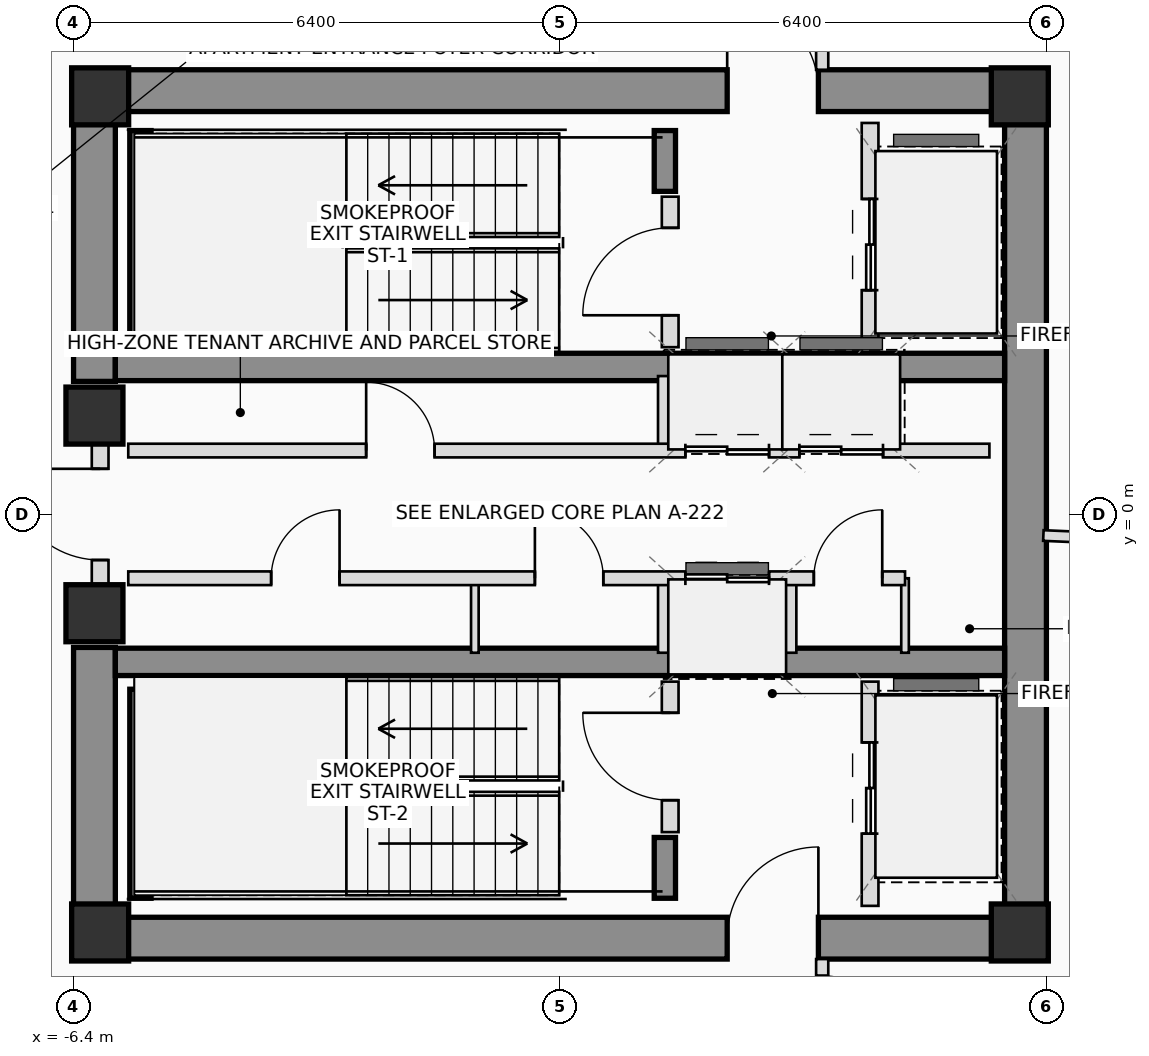
"""IFC4 building model, lengths in metres.
Left out: names, types, materials, properties, quantities, classifications, styles, units other than length and angle.
Written with IfcOpenShell. Run it as: python <this file> out.ifc"""

import sys

from ifc_helpers import new_model, si_unit, direction, frame, frame_2d, origin, origin_2d, place, context, subcontext, project, spatial, rectangle, extrude, source, transform, mapped, element, fill, save


model = new_model("IFC4")
c1 = context("Model", 3, precision=1e-05, world=origin(), true_north=direction((0.0, 1.0)))
c2 = subcontext(c1, "Body", "Model", "MODEL_VIEW")
j1 = project(units=[si_unit("LENGTHUNIT", "METRE"), si_unit("PLANEANGLEUNIT", "RADIAN")], contexts=[c1])
p1 = place(None, origin())
s1 = spatial("IfcSite", under=j1, at=p1, CompositionType="ELEMENT")
p2 = place(p1, origin())
s2 = spatial("IfcBuilding", under=s1, at=p2, CompositionType="ELEMENT")
p3 = place(p2, frame((0.0, 0.0, 232.05)))
s3 = spatial("IfcBuildingStorey", under=s2, at=p3, CompositionType="ELEMENT", Elevation=232.05)
m1 = source(origin(), c2, "Body", "SweptSolid", [
    extrude(rectangle(XDim=0.75, YDim=0.75, at=origin_2d()), origin(), (0.0, 0.0, 1.0), 3.4),
])
for number, where, z_axis, x_axis in (
    (1, (-6.05, -5.5, 0.0), (0.0, 0.0, 1.0), (1.0, 0.0, 0.0)),
    (2, (6.05, -5.5, 0.0), (0.0, 0.0, 1.0), (1.0, 0.0, 0.0)),
    (3, (6.05, 5.5, 0.0), (0.0, 0.0, 1.0), (1.0, 0.0, 0.0)),
    (4, (-6.05, 5.5, 0.0), (0.0, 0.0, 1.0), (1.0, 0.0, 0.0)),
):
    element("IfcColumn", number, at=place(p3, frame(where, z_axis=z_axis, x_axis=x_axis)), inside=s3, PredefinedType="COLUMN", context=c2, shape_type="MappedRepresentation", body=[
        mapped(m1, transform((0.0, 0.0, 0.0), scale=1.0)),
    ])
p4 = place(p3, frame((-6.4, 5.575, 0.0), z_axis=(0.0, 0.0, 1.0), x_axis=(1.0, 0.0, 0.0)))
e5 = element("IfcWall", 5, at=p4, inside=s3, PredefinedType="SHEAR", context=c2, shape_type="SweptSolid", body=[
    extrude(rectangle(XDim=12.8, YDim=0.55, at=frame_2d((6.4, 0.0))), origin(), (0.0, 0.0, 1.0), 3.4),
])
p5 = place(p4, frame((8.6, 0.0, 0.0)))
e6 = element("IfcOpeningElement", 6, at=p5, cuts=e5, PredefinedType="OPENING", context=c2, shape_type="SweptSolid", body=[
    extrude(rectangle(XDim=1.2, YDim=2.2, at=frame_2d((0.6, 1.1))), frame((0.0, 0.285, 0.0), z_axis=(0.0, -1.0, 0.0), x_axis=(1.0, 0.0, 0.0)), (0.0, 0.0, 1.0), 0.57),
])
p6 = place(p3, frame((-6.4, -5.575, 0.0), z_axis=(0.0, 0.0, 1.0), x_axis=(1.0, 0.0, 0.0)))
e7 = element("IfcWall", 7, at=p6, inside=s3, PredefinedType="SHEAR", context=c2, shape_type="SweptSolid", body=[
    extrude(rectangle(XDim=12.8, YDim=0.55, at=frame_2d((6.4, 0.0))), origin(), (0.0, 0.0, 1.0), 3.4),
])
p7 = place(p6, frame((8.6, 0.0, 0.0)))
e8 = element("IfcOpeningElement", 8, at=p7, cuts=e7, PredefinedType="OPENING", context=c2, shape_type="SweptSolid", body=[
    extrude(rectangle(XDim=1.2, YDim=2.2, at=frame_2d((0.6, 1.1))), frame((0.0, 0.285, 0.0), z_axis=(0.0, -1.0, 0.0), x_axis=(1.0, 0.0, 0.0)), (0.0, 0.0, 1.0), 0.57),
])
p8 = place(p3, frame((6.125, -5.3, 0.0), z_axis=(0.0, 0.0, 1.0), x_axis=(0.0, 1.0, 0.0)))
e9 = element("IfcWall", 9, at=p8, inside=s3, PredefinedType="SHEAR", context=c2, shape_type="SweptSolid", body=[
    extrude(rectangle(XDim=10.6, YDim=0.55, at=frame_2d((5.3, 0.0))), origin(), (0.0, 0.0, 1.0), 3.4),
])
for number, where, z_axis, x_axis in (
    (10, (-6.125, -5.3, 0.0), (0.0, 0.0, 1.0), (0.0, 1.0, 0.0)),
    (11, (-6.125, 1.75, 0.0), (0.0, 0.0, 1.0), (0.0, 1.0, 0.0)),
):
    element("IfcWall", number, at=place(p3, frame(where, z_axis=z_axis, x_axis=x_axis)), inside=s3, PredefinedType="SHEAR", context=c2, shape_type="SweptSolid", body=[
        extrude(rectangle(XDim=3.55, YDim=0.55, at=frame_2d((1.775, 0.0))), origin(), (0.0, 0.0, 1.0), 3.4),
    ])
for number, where, z_axis, x_axis in (
    (12, (-5.85, 1.94, 0.0), (0.0, 0.0, 1.0), (1.0, 0.0, 0.0)),
    (13, (-5.85, -1.94, 0.0), (0.0, 0.0, 1.0), (1.0, 0.0, 0.0)),
):
    element("IfcWall", number, at=place(p3, frame(where, z_axis=z_axis, x_axis=x_axis)), inside=s3, PredefinedType="SHEAR", context=c2, shape_type="SweptSolid", body=[
        extrude(rectangle(XDim=11.7, YDim=0.36, at=frame_2d((5.85, 0.0))), origin(), (0.0, 0.0, 1.0), 3.4),
    ])
p9 = place(p3, frame((-5.52, 2.3, 0.0), z_axis=(0.0, 0.0, 1.0), x_axis=(0.0, 1.0, 0.0)))
e14 = element("IfcWall", 14, at=p9, inside=s3, PredefinedType="SHEAR", context=c2, shape_type="SweptSolid", body=[
    extrude(rectangle(XDim=2.75, YDim=0.28, at=frame_2d((1.375, 0.0))), origin(), (0.0, 0.0, 1.0), 3.4),
])
p10 = place(p3, frame((1.38, 4.25, 0.0), z_axis=(0.0, 0.0, 1.0), x_axis=(0.0, 1.0, 0.0)))
e15 = element("IfcWall", 15, at=p10, inside=s3, PredefinedType="SHEAR", context=c2, shape_type="SweptSolid", body=[
    extrude(rectangle(XDim=0.8, YDim=0.28, at=frame_2d((0.4, 0.0))), origin(), (0.0, 0.0, 1.0), 3.4),
])
p11 = place(p3, frame((-5.52, -5.05, 0.0), z_axis=(0.0, 0.0, 1.0), x_axis=(0.0, 1.0, 0.0)))
e16 = element("IfcWall", 16, at=p11, inside=s3, PredefinedType="SHEAR", context=c2, shape_type="SweptSolid", body=[
    extrude(rectangle(XDim=2.75, YDim=0.28, at=frame_2d((1.375, 0.0))), origin(), (0.0, 0.0, 1.0), 3.4),
])
p12 = place(p3, frame((1.38, -5.05, 0.0), z_axis=(0.0, 0.0, 1.0), x_axis=(0.0, 1.0, 0.0)))
e17 = element("IfcWall", 17, at=p12, inside=s3, PredefinedType="SHEAR", context=c2, shape_type="SweptSolid", body=[
    extrude(rectangle(XDim=0.8, YDim=0.28, at=frame_2d((0.4, 0.0))), origin(), (0.0, 0.0, 1.0), 3.4),
])
for number, where, z_axis, x_axis in (
    (18, (-6.125, -1.3, 0.0), (0.0, 0.0, 1.0), (1.0, 0.0, 0.0)),
    (19, (-6.125, 1.3, 0.0), (0.0, 0.0, 1.0), (1.0, 0.0, 0.0)),
):
    element("IfcColumn", number, at=place(p3, frame(where, z_axis=z_axis, x_axis=x_axis)), inside=s3, PredefinedType="COLUMN", context=c2, shape_type="MappedRepresentation", body=[
        mapped(m1, transform((0.0, 0.0, 0.0), scale=1.0)),
    ])
p13 = place(p3, frame((-6.05, -0.95, 0.0), z_axis=(0.0, 0.0, 1.0), x_axis=(0.0, 1.0, 0.0)))
e20 = element("IfcWall", 20, at=p13, inside=s3, PredefinedType="PLUMBINGWALL", context=c2, shape_type="SweptSolid", body=[
    extrude(rectangle(XDim=1.9, YDim=0.22, at=frame_2d((0.95, 0.0))), origin(), (0.0, 0.0, 1.0), 2.18),
])
p14 = place(p13, frame((0.35, 0.0, 0.0)))
e21 = element("IfcOpeningElement", 21, at=p14, cuts=e20, PredefinedType="OPENING", context=c2, shape_type="SweptSolid", body=[
    extrude(rectangle(XDim=1.2, YDim=2.2, at=frame_2d((0.6, 1.1))), frame((0.0, 0.12, 0.0), z_axis=(0.0, -1.0, 0.0), x_axis=(1.0, 0.0, 0.0)), (0.0, 0.0, 1.0), 0.24),
])
p15 = place(p3, frame((1.45, 2.2, 0.0), z_axis=(0.0, 0.0, 1.0), x_axis=(0.0, 1.0, 0.0)))
e22 = element("IfcWall", 22, at=p15, inside=s3, PredefinedType="PLUMBINGWALL", context=c2, shape_type="SweptSolid", body=[
    extrude(rectangle(XDim=1.98, YDim=0.22, at=frame_2d((0.99, 0.0))), origin(), (0.0, 0.0, 1.0), 3.2),
])
p16 = place(p15, frame((0.42, 0.0, 0.0)))
e23 = element("IfcOpeningElement", 23, at=p16, cuts=e22, PredefinedType="OPENING", context=c2, shape_type="SweptSolid", body=[
    extrude(rectangle(XDim=1.15, YDim=2.15, at=frame_2d((0.575, 1.075))), frame((0.0, 0.12, 0.0), z_axis=(0.0, -1.0, 0.0), x_axis=(1.0, 0.0, 0.0)), (0.0, 0.0, 1.0), 0.24),
])
p17 = place(p3, frame((4.08, 2.2, 0.0), z_axis=(0.0, 0.0, 1.0), x_axis=(0.0, 1.0, 0.0)))
e24 = element("IfcWall", 24, at=p17, inside=s3, PredefinedType="PLUMBINGWALL", context=c2, shape_type="SweptSolid", body=[
    extrude(rectangle(XDim=2.95, YDim=0.22, at=frame_2d((1.475, 0.0))), origin(), (0.0, 0.0, 1.0), 3.2),
])
p18 = place(p17, frame((0.75, 0.0, 0.0)))
e25 = element("IfcOpeningElement", 25, at=p18, cuts=e24, PredefinedType="OPENING", context=c2, shape_type="SweptSolid", body=[
    extrude(rectangle(XDim=1.2, YDim=2.25, at=frame_2d((0.6, 1.125))), frame((0.0, 0.12, 0.0), z_axis=(0.0, -1.0, 0.0), x_axis=(1.0, 0.0, 0.0)), (0.0, 0.0, 1.0), 0.24),
])
p19 = place(p3, frame((1.45, -4.18, 0.0), z_axis=(0.0, 0.0, 1.0), x_axis=(0.0, 1.0, 0.0)))
e26 = element("IfcWall", 26, at=p19, inside=s3, PredefinedType="PLUMBINGWALL", context=c2, shape_type="SweptSolid", body=[
    extrude(rectangle(XDim=1.98, YDim=0.22, at=frame_2d((0.99, 0.0))), origin(), (0.0, 0.0, 1.0), 3.2),
])
p20 = place(p19, frame((0.42, 0.0, 0.0)))
e27 = element("IfcOpeningElement", 27, at=p20, cuts=e26, PredefinedType="OPENING", context=c2, shape_type="SweptSolid", body=[
    extrude(rectangle(XDim=1.15, YDim=2.15, at=frame_2d((0.575, 1.075))), frame((0.0, 0.12, 0.0), z_axis=(0.0, -1.0, 0.0), x_axis=(1.0, 0.0, 0.0)), (0.0, 0.0, 1.0), 0.24),
])
p21 = place(p3, frame((4.08, -5.15, 0.0), z_axis=(0.0, 0.0, 1.0), x_axis=(0.0, 1.0, 0.0)))
e28 = element("IfcWall", 28, at=p21, inside=s3, PredefinedType="PLUMBINGWALL", context=c2, shape_type="SweptSolid", body=[
    extrude(rectangle(XDim=2.95, YDim=0.22, at=frame_2d((1.475, 0.0))), origin(), (0.0, 0.0, 1.0), 3.2),
])
p22 = place(p21, frame((0.95, 0.0, 0.0)))
e29 = element("IfcOpeningElement", 29, at=p22, cuts=e28, PredefinedType="OPENING", context=c2, shape_type="SweptSolid", body=[
    extrude(rectangle(XDim=1.2, YDim=2.25, at=frame_2d((0.6, 1.125))), frame((0.0, 0.12, 0.0), z_axis=(0.0, -1.0, 0.0), x_axis=(1.0, 0.0, 0.0)), (0.0, 0.0, 1.0), 0.24),
])
p23 = place(p3, frame((-1.12, -1.82, 0.0), z_axis=(0.0, 0.0, 1.0), x_axis=(0.0, 1.0, 0.0)))
e30 = element("IfcWall", 30, at=p23, inside=s3, PredefinedType="PARTITIONING", context=c2, shape_type="SweptSolid", body=[
    extrude(rectangle(XDim=0.98, YDim=0.1, at=frame_2d((0.49, 0.0))), origin(), (0.0, 0.0, 1.0), 3.2),
])
for number, where, z_axis, x_axis in (
    (31, (1.38, 0.84, 0.0), (0.0, 0.0, 1.0), (0.0, 1.0, 0.0)),
    (32, (1.38, -1.82, 0.0), (0.0, 0.0, 1.0), (0.0, 1.0, 0.0)),
    (33, (3.02, 0.84, 0.0), (0.0, 0.0, 1.0), (0.0, 1.0, 0.0)),
    (34, (4.38, 0.84, 0.0), (0.0, 0.0, 1.0), (0.0, 1.0, 0.0)),
    (35, (3.02, -1.82, 0.0), (0.0, 0.0, 1.0), (0.0, 1.0, 0.0)),
):
    element("IfcWall", number, at=place(p3, frame(where, z_axis=z_axis, x_axis=x_axis)), inside=s3, PredefinedType="PLUMBINGWALL", context=c2, shape_type="SweptSolid", body=[
        extrude(rectangle(XDim=0.98, YDim=0.18, at=frame_2d((0.49, 0.0))), origin(), (0.0, 0.0, 1.0), 3.2),
    ])
p24 = place(p3, frame((4.54, -1.82, 0.0), z_axis=(0.0, 0.0, 1.0), x_axis=(0.0, 1.0, 0.0)))
e36 = element("IfcWall", 36, at=p24, inside=s3, PredefinedType="PARTITIONING", context=c2, shape_type="SweptSolid", body=[
    extrude(rectangle(XDim=0.98, YDim=0.1, at=frame_2d((0.49, 0.0))), origin(), (0.0, 0.0, 1.0), 3.2),
])
p25 = place(p3, frame((-5.68, 0.84, 0.0), z_axis=(0.0, 0.0, 1.0), x_axis=(1.0, 0.0, 0.0)))
e37 = element("IfcWall", 37, at=p25, inside=s3, PredefinedType="PLUMBINGWALL", context=c2, shape_type="SweptSolid", body=[
    extrude(rectangle(XDim=11.33, YDim=0.18, at=frame_2d((5.665, 0.0))), origin(), (0.0, 0.0, 1.0), 3.2),
])
p26 = place(p25, frame((3.13, 0.0, 0.0)))
e38 = element("IfcOpeningElement", 38, at=p26, cuts=e37, PredefinedType="OPENING", context=c2, shape_type="SweptSolid", body=[
    extrude(rectangle(XDim=0.9, YDim=2.05, at=frame_2d((0.45, 1.025))), frame((0.0, 0.1, 0.0), z_axis=(0.0, -1.0, 0.0), x_axis=(1.0, 0.0, 0.0)), (0.0, 0.0, 1.0), 0.2),
])
p27 = place(p25, frame((7.33, 0.0, 0.0)))
e39 = element("IfcOpeningElement", 39, at=p27, cuts=e37, PredefinedType="OPENING", context=c2, shape_type="SweptSolid", body=[
    extrude(rectangle(XDim=1.1, YDim=2.2, at=frame_2d((0.55, 1.1))), frame((0.0, 0.1, 0.0), z_axis=(0.0, -1.0, 0.0), x_axis=(1.0, 0.0, 0.0)), (0.0, 0.0, 1.0), 0.2),
])
p28 = place(p25, frame((8.83, 0.0, 0.0)))
e40 = element("IfcOpeningElement", 40, at=p28, cuts=e37, PredefinedType="OPENING", context=c2, shape_type="SweptSolid", body=[
    extrude(rectangle(XDim=1.1, YDim=2.2, at=frame_2d((0.55, 1.1))), frame((0.0, 0.1, 0.0), z_axis=(0.0, -1.0, 0.0), x_axis=(1.0, 0.0, 0.0)), (0.0, 0.0, 1.0), 0.2),
])
p29 = place(p3, frame((-5.68, -0.84, 0.0), z_axis=(0.0, 0.0, 1.0), x_axis=(1.0, 0.0, 0.0)))
e41 = element("IfcWall", 41, at=p29, inside=s3, PredefinedType="PLUMBINGWALL", context=c2, shape_type="SweptSolid", body=[
    extrude(rectangle(XDim=10.22, YDim=0.18, at=frame_2d((5.11, 0.0))), origin(), (0.0, 0.0, 1.0), 3.2),
])
p30 = place(p29, frame((1.88, 0.0, 0.0)))
e42 = element("IfcOpeningElement", 42, at=p30, cuts=e41, PredefinedType="OPENING", context=c2, shape_type="SweptSolid", body=[
    extrude(rectangle(XDim=0.9, YDim=2.05, at=frame_2d((0.45, 1.025))), frame((0.0, 0.1, 0.0), z_axis=(0.0, -1.0, 0.0), x_axis=(1.0, 0.0, 0.0)), (0.0, 0.0, 1.0), 0.2),
])
p31 = place(p29, frame((5.35, 0.0, 0.0)))
e43 = element("IfcOpeningElement", 43, at=p31, cuts=e41, PredefinedType="OPENING", context=c2, shape_type="SweptSolid", body=[
    extrude(rectangle(XDim=0.9, YDim=2.05, at=frame_2d((0.45, 1.025))), frame((0.0, 0.1, 0.0), z_axis=(0.0, -1.0, 0.0), x_axis=(1.0, 0.0, 0.0)), (0.0, 0.0, 1.0), 0.2),
])
p32 = place(p29, frame((7.33, 0.0, 0.0)))
e44 = element("IfcOpeningElement", 44, at=p32, cuts=e41, PredefinedType="OPENING", context=c2, shape_type="SweptSolid", body=[
    extrude(rectangle(XDim=1.1, YDim=2.2, at=frame_2d((0.55, 1.1))), frame((0.0, 0.1, 0.0), z_axis=(0.0, -1.0, 0.0), x_axis=(1.0, 0.0, 0.0)), (0.0, 0.0, 1.0), 0.2),
])
p33 = place(p29, frame((9.02, 0.0, 0.0)))
e45 = element("IfcOpeningElement", 45, at=p33, cuts=e41, PredefinedType="OPENING", context=c2, shape_type="SweptSolid", body=[
    extrude(rectangle(XDim=0.9, YDim=2.05, at=frame_2d((0.45, 1.025))), frame((0.0, 0.1, 0.0), z_axis=(0.0, -1.0, 0.0), x_axis=(1.0, 0.0, 0.0)), (0.0, 0.0, 1.0), 0.2),
])
p34 = place(p3, frame((3.45, 7.49, 0.0), z_axis=(0.0, 0.0, 1.0), x_axis=(0.0, -1.0, 0.0)))
e46 = element("IfcWall", 46, at=p34, inside=s3, PredefinedType="PARTITIONING", context=c2, shape_type="SweptSolid", body=[
    extrude(rectangle(XDim=1.64, YDim=0.16, at=frame_2d((0.82, 0.0))), origin(), (0.0, 0.0, 1.0), 3.2),
])
p35 = place(p34, frame((0.32, 0.0, 0.0)))
e47 = element("IfcOpeningElement", 47, at=p35, cuts=e46, PredefinedType="OPENING", context=c2, shape_type="SweptSolid", body=[
    extrude(rectangle(XDim=1.0, YDim=2.25, at=frame_2d((0.5, 1.125))), frame((0.0, 0.09, 0.0), z_axis=(0.0, -1.0, 0.0), x_axis=(1.0, 0.0, 0.0)), (0.0, 0.0, 1.0), 0.18),
])
p36 = place(p3, frame((3.45, -5.85, 0.0), z_axis=(0.0, 0.0, 1.0), x_axis=(0.0, -1.0, 0.0)))
e48 = element("IfcWall", 48, at=p36, inside=s3, PredefinedType="PARTITIONING", context=c2, shape_type="SweptSolid", body=[
    extrude(rectangle(XDim=1.64, YDim=0.16, at=frame_2d((0.82, 0.0))), origin(), (0.0, 0.0, 1.0), 3.2),
])
p37 = place(p36, frame((0.22, 0.0, 0.0)))
e49 = element("IfcOpeningElement", 49, at=p37, cuts=e48, PredefinedType="OPENING", context=c2, shape_type="SweptSolid", body=[
    extrude(rectangle(XDim=1.0, YDim=2.25, at=frame_2d((0.5, 1.125))), frame((0.0, 0.09, 0.0), z_axis=(0.0, -1.0, 0.0), x_axis=(1.0, 0.0, 0.0)), (0.0, 0.0, 1.0), 0.18),
])
p38 = place(p3, frame((6.36, -0.278, 0.0), z_axis=(0.0, 0.0, 1.0), x_axis=(0.99904773846, -0.043630451279, 0.0)))
e50 = element("IfcWall", 50, at=p38, inside=s3, PredefinedType="PARTITIONING", context=c2, shape_type="SweptSolid", body=[
    extrude(rectangle(XDim=8.992, YDim=0.14, at=frame_2d((4.496, 0.0))), origin(), (0.0, 0.0, 1.0), 2.605),
])
p39 = place(p5, origin())
e51 = element("IfcDoor", 51, at=p39, inside=s3, OperationType="SINGLE_SWING_LEFT", PredefinedType="DOOR", context=c2, shape_type="SweptSolid", body=[
    extrude(rectangle(XDim=1.2, YDim=2.2, at=frame_2d((0.6, 1.1))), frame((0.0, 0.025, 0.0), z_axis=(0.0, -1.0, 0.0), x_axis=(1.0, 0.0, 0.0)), (0.0, 0.0, 1.0), 0.05),
])
fill(e6, e51)
p40 = place(p7, origin())
e52 = element("IfcDoor", 52, at=p40, inside=s3, OperationType="SINGLE_SWING_RIGHT", PredefinedType="DOOR", context=c2, shape_type="SweptSolid", body=[
    extrude(rectangle(XDim=1.2, YDim=2.2, at=frame_2d((0.6, 1.1))), frame((0.0, 0.025, 0.0), z_axis=(0.0, -1.0, 0.0), x_axis=(1.0, 0.0, 0.0)), (0.0, 0.0, 1.0), 0.05),
])
fill(e8, e52)
p41 = place(p14, origin())
e53 = element("IfcDoor", 53, at=p41, inside=s3, OperationType="SINGLE_SWING_RIGHT", PredefinedType="DOOR", context=c2, shape_type="SweptSolid", body=[
    extrude(rectangle(XDim=1.2, YDim=2.2, at=frame_2d((0.6, 1.1))), frame((0.0, 0.025, 0.0), z_axis=(0.0, -1.0, 0.0), x_axis=(1.0, 0.0, 0.0)), (0.0, 0.0, 1.0), 0.05),
])
fill(e21, e53)
p42 = place(p16, origin())
e54 = element("IfcDoor", 54, at=p42, inside=s3, OperationType="SINGLE_SWING_LEFT", PredefinedType="DOOR", context=c2, shape_type="SweptSolid", body=[
    extrude(rectangle(XDim=1.15, YDim=2.15, at=frame_2d((0.575, 1.075))), frame((0.0, 0.025, 0.0), z_axis=(0.0, -1.0, 0.0), x_axis=(1.0, 0.0, 0.0)), (0.0, 0.0, 1.0), 0.05),
])
fill(e23, e54)
p43 = place(p18, origin())
e55 = element("IfcDoor", 55, at=p43, inside=s3, OperationType="DOUBLE_DOOR_SLIDING", PredefinedType="DOOR", context=c2, shape_type="SweptSolid", body=[
    extrude(rectangle(XDim=1.2, YDim=2.25, at=frame_2d((0.6, 1.125))), frame((0.0, 0.025, 0.0), z_axis=(0.0, -1.0, 0.0), x_axis=(1.0, 0.0, 0.0)), (0.0, 0.0, 1.0), 0.05),
])
fill(e25, e55)
p44 = place(p20, origin())
e56 = element("IfcDoor", 56, at=p44, inside=s3, OperationType="SINGLE_SWING_RIGHT", PredefinedType="DOOR", context=c2, shape_type="SweptSolid", body=[
    extrude(rectangle(XDim=1.15, YDim=2.15, at=frame_2d((0.575, 1.075))), frame((0.0, 0.025, 0.0), z_axis=(0.0, -1.0, 0.0), x_axis=(1.0, 0.0, 0.0)), (0.0, 0.0, 1.0), 0.05),
])
fill(e27, e56)
p45 = place(p22, origin())
e57 = element("IfcDoor", 57, at=p45, inside=s3, OperationType="DOUBLE_DOOR_SLIDING", PredefinedType="DOOR", context=c2, shape_type="SweptSolid", body=[
    extrude(rectangle(XDim=1.2, YDim=2.25, at=frame_2d((0.6, 1.125))), frame((0.0, 0.025, 0.0), z_axis=(0.0, -1.0, 0.0), x_axis=(1.0, 0.0, 0.0)), (0.0, 0.0, 1.0), 0.05),
])
fill(e29, e57)
p46 = place(p26, origin())
e58 = element("IfcDoor", 58, at=p46, inside=s3, OperationType="SINGLE_SWING_LEFT", PredefinedType="DOOR", context=c2, shape_type="SweptSolid", body=[
    extrude(rectangle(XDim=0.9, YDim=2.05, at=frame_2d((0.45, 1.025))), frame((0.0, 0.025, 0.0), z_axis=(0.0, -1.0, 0.0), x_axis=(1.0, 0.0, 0.0)), (0.0, 0.0, 1.0), 0.05),
])
fill(e38, e58)
p47 = place(p27, origin())
e59 = element("IfcDoor", 59, at=p47, inside=s3, OperationType="DOUBLE_DOOR_SLIDING", PredefinedType="DOOR", context=c2, shape_type="SweptSolid", body=[
    extrude(rectangle(XDim=1.1, YDim=2.2, at=frame_2d((0.55, 1.1))), frame((0.0, 0.025, 0.0), z_axis=(0.0, -1.0, 0.0), x_axis=(1.0, 0.0, 0.0)), (0.0, 0.0, 1.0), 0.05),
])
fill(e39, e59)
p48 = place(p28, origin())
e60 = element("IfcDoor", 60, at=p48, inside=s3, OperationType="DOUBLE_DOOR_SLIDING", PredefinedType="DOOR", context=c2, shape_type="SweptSolid", body=[
    extrude(rectangle(XDim=1.1, YDim=2.2, at=frame_2d((0.55, 1.1))), frame((0.0, 0.025, 0.0), z_axis=(0.0, -1.0, 0.0), x_axis=(1.0, 0.0, 0.0)), (0.0, 0.0, 1.0), 0.05),
])
fill(e40, e60)
p49 = place(p30, origin())
e61 = element("IfcDoor", 61, at=p49, inside=s3, OperationType="SINGLE_SWING_RIGHT", PredefinedType="DOOR", context=c2, shape_type="SweptSolid", body=[
    extrude(rectangle(XDim=0.9, YDim=2.05, at=frame_2d((0.45, 1.025))), frame((0.0, 0.025, 0.0), z_axis=(0.0, -1.0, 0.0), x_axis=(1.0, 0.0, 0.0)), (0.0, 0.0, 1.0), 0.05),
])
fill(e42, e61)
p50 = place(p31, origin())
e62 = element("IfcDoor", 62, at=p50, inside=s3, OperationType="SINGLE_SWING_LEFT", PredefinedType="DOOR", context=c2, shape_type="SweptSolid", body=[
    extrude(rectangle(XDim=0.9, YDim=2.05, at=frame_2d((0.45, 1.025))), frame((0.0, 0.025, 0.0), z_axis=(0.0, -1.0, 0.0), x_axis=(1.0, 0.0, 0.0)), (0.0, 0.0, 1.0), 0.05),
])
fill(e43, e62)
p51 = place(p32, origin())
e63 = element("IfcDoor", 63, at=p51, inside=s3, OperationType="DOUBLE_DOOR_SLIDING", PredefinedType="DOOR", context=c2, shape_type="SweptSolid", body=[
    extrude(rectangle(XDim=1.1, YDim=2.2, at=frame_2d((0.55, 1.1))), frame((0.0, 0.025, 0.0), z_axis=(0.0, -1.0, 0.0), x_axis=(1.0, 0.0, 0.0)), (0.0, 0.0, 1.0), 0.05),
])
fill(e44, e63)
p52 = place(p33, origin())
e64 = element("IfcDoor", 64, at=p52, inside=s3, OperationType="SINGLE_SWING_RIGHT", PredefinedType="DOOR", context=c2, shape_type="SweptSolid", body=[
    extrude(rectangle(XDim=0.9, YDim=2.05, at=frame_2d((0.45, 1.025))), frame((0.0, 0.025, 0.0), z_axis=(0.0, -1.0, 0.0), x_axis=(1.0, 0.0, 0.0)), (0.0, 0.0, 1.0), 0.05),
])
fill(e45, e64)
p53 = place(p37, origin())
e65 = element("IfcDoor", 65, at=p53, inside=s3, OperationType="SINGLE_SWING_RIGHT", PredefinedType="DOOR", context=c2, shape_type="SweptSolid", body=[
    extrude(rectangle(XDim=1.0, YDim=2.25, at=frame_2d((0.5, 1.125))), frame((0.0, 0.025, 0.0), z_axis=(0.0, -1.0, 0.0), x_axis=(1.0, 0.0, 0.0)), (0.0, 0.0, 1.0), 0.05),
])
fill(e49, e65)
save(model, sys.argv[1])
